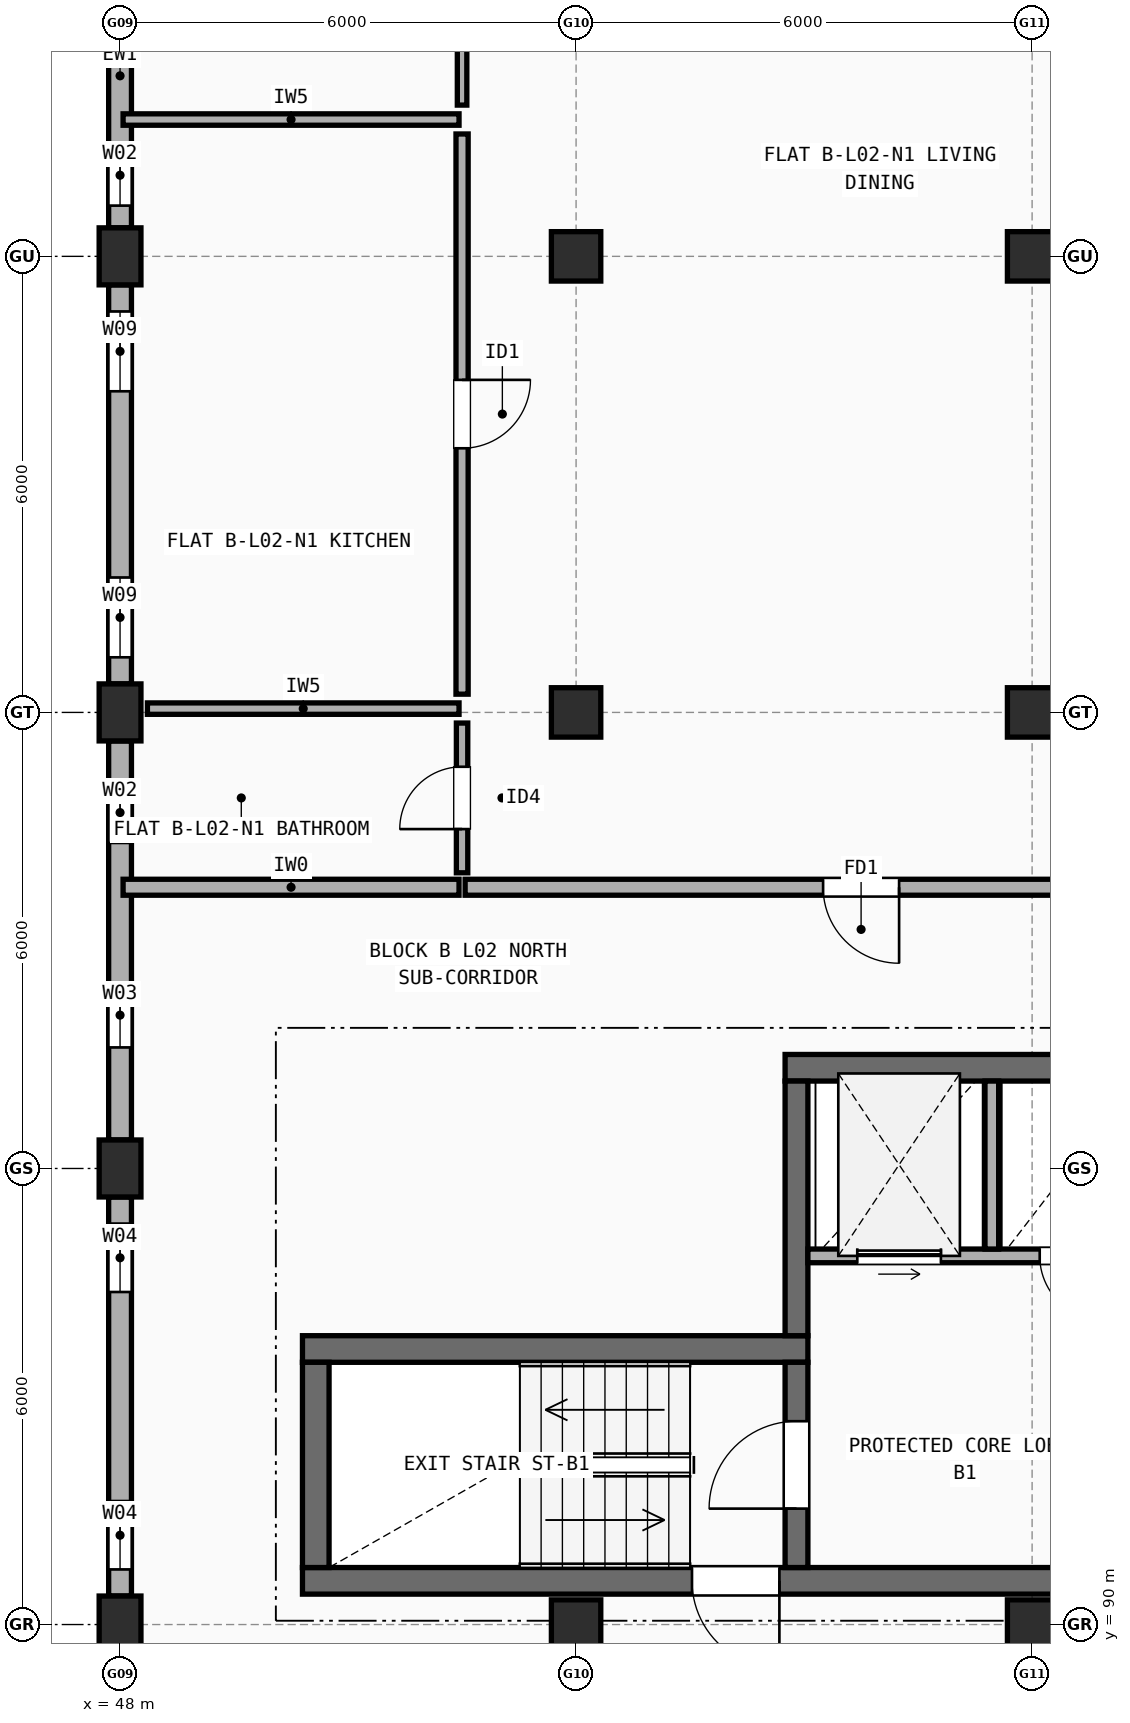
"""IFC4 building model, lengths in metres.
Left out: names, types, materials, properties, quantities, classifications, styles, units other than length and angle.
Written with IfcOpenShell. Run it as: python <this file> out.ifc"""

import sys

from ifc_helpers import new_model, si_unit, direction, frame, frame_2d, origin, origin_2d, place, context, subcontext, project, spatial, rectangle, extrude, element, fill, save


model = new_model("IFC4")
c1 = context("Model", 3, precision=1e-05, world=origin(), true_north=direction((0.0, 1.0)))
c2 = subcontext(c1, "Body", "Model", "MODEL_VIEW")
j1 = project(units=[si_unit("LENGTHUNIT", "METRE"), si_unit("PLANEANGLEUNIT", "RADIAN")], contexts=[c1])
p1 = place(None, origin())
s1 = spatial("IfcSite", under=j1, at=p1, CompositionType="ELEMENT")
p2 = place(p1, origin())
s2 = spatial("IfcBuilding", under=s1, at=p2, CompositionType="ELEMENT")
p3 = place(p2, frame((0.0, 0.0, 7.7)))
s3 = spatial("IfcBuildingStorey", under=s2, at=p3, CompositionType="ELEMENT", Elevation=7.7)
for number, where, z_axis, x_axis in (
    (1, (48.0, 90.0, 0.0), (0.0, 0.0, 1.0), (1.0, 0.0, 0.0)),
    (2, (48.0, 96.0, 0.0), (0.0, 0.0, 1.0), (1.0, 0.0, 0.0)),
    (3, (48.0, 102.0, 0.0), (0.0, 0.0, 1.0), (1.0, 0.0, 0.0)),
    (4, (48.0, 108.0, 0.0), (0.0, 0.0, 1.0), (1.0, 0.0, 0.0)),
):
    element("IfcColumn", number, at=place(p3, frame(where, z_axis=z_axis, x_axis=x_axis)), inside=s3, PredefinedType="COLUMN", context=c2, shape_type="SweptSolid", body=[
        extrude(rectangle(XDim=0.55, YDim=0.75, at=origin_2d()), origin(), (0.0, 0.0, 1.0), 2.955),
    ])
for number, where, z_axis, x_axis in (
    (5, (54.0, 90.0, 0.0), (0.0, 0.0, 1.0), (1.0, 0.0, 0.0)),
    (6, (54.0, 102.0, 0.0), (0.0, 0.0, 1.0), (1.0, 0.0, 0.0)),
    (7, (54.0, 108.0, 0.0), (0.0, 0.0, 1.0), (1.0, 0.0, 0.0)),
    (8, (60.0, 90.0, 0.0), (0.0, 0.0, 1.0), (1.0, 0.0, 0.0)),
    (9, (60.0, 102.0, 0.0), (0.0, 0.0, 1.0), (1.0, 0.0, 0.0)),
    (10, (60.0, 108.0, 0.0), (0.0, 0.0, 1.0), (1.0, 0.0, 0.0)),
):
    element("IfcColumn", number, at=place(p3, frame(where, z_axis=z_axis, x_axis=x_axis)), inside=s3, PredefinedType="COLUMN", context=c2, shape_type="SweptSolid", body=[
        extrude(rectangle(XDim=0.65, YDim=0.65, at=origin_2d()), origin(), (0.0, 0.0, 1.0), 2.955),
    ])
p4 = place(p3, frame((48.0, 113.625, 0.0), z_axis=(0.0, 0.0, 1.0), x_axis=(0.0, -1.0, 0.0)))
e11 = element("IfcWall", 11, at=p4, inside=s3, PredefinedType="STANDARD", context=c2, shape_type="SweptSolid", body=[
    extrude(rectangle(XDim=5.25, YDim=0.3, at=frame_2d((2.625, 0.0))), origin(), (0.0, 0.0, 1.0), 2.437),
])
p5 = place(p4, frame((1.442, 0.0, 0.9)))
e12 = element("IfcOpeningElement", 12, at=p5, cuts=e11, PredefinedType="OPENING", context=c2, shape_type="SweptSolid", body=[
    extrude(rectangle(XDim=0.9, YDim=1.3, at=frame_2d((0.45, 0.65))), frame((0.0, 0.16, 0.0), z_axis=(0.0, -1.0, 0.0), x_axis=(1.0, 0.0, 0.0)), (0.0, 0.0, 1.0), 0.32),
])
p6 = place(p4, frame((4.157, 0.0, 0.9)))
e13 = element("IfcOpeningElement", 13, at=p6, cuts=e11, PredefinedType="OPENING", context=c2, shape_type="SweptSolid", body=[
    extrude(rectangle(XDim=0.8, YDim=1.2, at=frame_2d((0.4, 0.6))), frame((0.0, 0.16, 0.0), z_axis=(0.0, -1.0, 0.0), x_axis=(1.0, 0.0, 0.0)), (0.0, 0.0, 1.0), 0.32),
])
p7 = place(p3, frame((48.0, 107.625, 0.0), z_axis=(0.0, 0.0, 1.0), x_axis=(0.0, -1.0, 0.0)))
e14 = element("IfcWall", 14, at=p7, inside=s3, PredefinedType="STANDARD", context=c2, shape_type="SweptSolid", body=[
    extrude(rectangle(XDim=5.25, YDim=0.3, at=frame_2d((2.625, 0.0))), origin(), (0.0, 0.0, 1.0), 2.437),
])
p8 = place(p7, frame((0.35, 0.0, 0.9)))
e15 = element("IfcOpeningElement", 15, at=p8, cuts=e14, PredefinedType="OPENING", context=c2, shape_type="SweptSolid", body=[
    extrude(rectangle(XDim=1.05, YDim=1.35, at=frame_2d((0.525, 0.675))), frame((0.0, 0.16, 0.0), z_axis=(0.0, -1.0, 0.0), x_axis=(1.0, 0.0, 0.0)), (0.0, 0.0, 1.0), 0.32),
])
p9 = place(p7, frame((3.85, 0.0, 0.9)))
e16 = element("IfcOpeningElement", 16, at=p9, cuts=e14, PredefinedType="OPENING", context=c2, shape_type="SweptSolid", body=[
    extrude(rectangle(XDim=1.05, YDim=1.35, at=frame_2d((0.525, 0.675))), frame((0.0, 0.16, 0.0), z_axis=(0.0, -1.0, 0.0), x_axis=(1.0, 0.0, 0.0)), (0.0, 0.0, 1.0), 0.32),
])
p10 = place(p3, frame((48.0, 101.625, 0.0), z_axis=(0.0, 0.0, 1.0), x_axis=(0.0, -1.0, 0.0)))
e17 = element("IfcWall", 17, at=p10, inside=s3, PredefinedType="STANDARD", context=c2, shape_type="SweptSolid", body=[
    extrude(rectangle(XDim=5.25, YDim=0.3, at=frame_2d((2.625, 0.0))), origin(), (0.0, 0.0, 1.0), 2.437),
])
p11 = place(p10, frame((0.542, 0.0, 0.9)))
e18 = element("IfcOpeningElement", 18, at=p11, cuts=e17, PredefinedType="OPENING", context=c2, shape_type="SweptSolid", body=[
    extrude(rectangle(XDim=0.8, YDim=1.2, at=frame_2d((0.4, 0.6))), frame((0.0, 0.16, 0.0), z_axis=(0.0, -1.0, 0.0), x_axis=(1.0, 0.0, 0.0)), (0.0, 0.0, 1.0), 0.32),
])
p12 = place(p10, frame((3.183, 0.0, 0.9)))
e19 = element("IfcOpeningElement", 19, at=p12, cuts=e17, PredefinedType="OPENING", context=c2, shape_type="SweptSolid", body=[
    extrude(rectangle(XDim=0.85, YDim=1.25, at=frame_2d((0.425, 0.625))), frame((0.0, 0.16, 0.0), z_axis=(0.0, -1.0, 0.0), x_axis=(1.0, 0.0, 0.0)), (0.0, 0.0, 1.0), 0.32),
])
p13 = place(p3, frame((48.0, 95.625, 0.0), z_axis=(0.0, 0.0, 1.0), x_axis=(0.0, -1.0, 0.0)))
e20 = element("IfcWall", 20, at=p13, inside=s3, PredefinedType="STANDARD", context=c2, shape_type="SweptSolid", body=[
    extrude(rectangle(XDim=5.25, YDim=0.3, at=frame_2d((2.625, 0.0))), origin(), (0.0, 0.0, 1.0), 2.437),
])
p14 = place(p13, frame((0.35, 0.0, 0.9)))
e21 = element("IfcOpeningElement", 21, at=p14, cuts=e20, PredefinedType="OPENING", context=c2, shape_type="SweptSolid", body=[
    extrude(rectangle(XDim=0.9, YDim=1.3, at=frame_2d((0.45, 0.65))), frame((0.0, 0.16, 0.0), z_axis=(0.0, -1.0, 0.0), x_axis=(1.0, 0.0, 0.0)), (0.0, 0.0, 1.0), 0.32),
])
p15 = place(p13, frame((4.0, 0.0, 0.9)))
e22 = element("IfcOpeningElement", 22, at=p15, cuts=e20, PredefinedType="OPENING", context=c2, shape_type="SweptSolid", body=[
    extrude(rectangle(XDim=0.9, YDim=1.3, at=frame_2d((0.45, 0.65))), frame((0.0, 0.16, 0.0), z_axis=(0.0, -1.0, 0.0), x_axis=(1.0, 0.0, 0.0)), (0.0, 0.0, 1.0), 0.32),
])
p16 = place(p3, frame((50.4, 90.575, 0.0), z_axis=(0.0, 0.0, 1.0), x_axis=(1.0, 0.0, 0.0)))
e23 = element("IfcWall", 23, at=p16, inside=s3, PredefinedType="SHEAR", context=c2, shape_type="SweptSolid", body=[
    extrude(rectangle(XDim=11.4, YDim=0.35, at=frame_2d((5.7, 0.0))), origin(), (0.0, 0.0, 1.0), 2.955),
])
p17 = place(p16, frame((5.125, 0.0, 0.0)))
e24 = element("IfcOpeningElement", 24, at=p17, cuts=e23, PredefinedType="OPENING", context=c2, shape_type="SweptSolid", body=[
    extrude(rectangle(XDim=1.15, YDim=2.15, at=frame_2d((0.575, 1.075))), frame((0.0, 0.185, 0.0), z_axis=(0.0, -1.0, 0.0), x_axis=(1.0, 0.0, 0.0)), (0.0, 0.0, 1.0), 0.37),
])
p18 = place(p3, frame((57.05, 93.625, 0.0), z_axis=(0.0, 0.0, 1.0), x_axis=(-1.0, 0.0, 0.0)))
e25 = element("IfcWall", 25, at=p18, inside=s3, PredefinedType="SHEAR", context=c2, shape_type="SweptSolid", body=[
    extrude(rectangle(XDim=6.65, YDim=0.35, at=frame_2d((3.325, 0.0))), origin(), (0.0, 0.0, 1.0), 2.955),
])
p19 = place(p3, frame((50.575, 93.45, 0.0), z_axis=(0.0, 0.0, 1.0), x_axis=(0.0, -1.0, 0.0)))
e26 = element("IfcWall", 26, at=p19, inside=s3, PredefinedType="SHEAR", context=c2, shape_type="SweptSolid", body=[
    extrude(rectangle(XDim=2.7, YDim=0.35, at=frame_2d((1.35, 0.0))), origin(), (0.0, 0.0, 1.0), 2.955),
])
p20 = place(p3, frame((56.9, 90.75, 0.0), z_axis=(0.0, 0.0, 1.0), x_axis=(0.0, 1.0, 0.0)))
e27 = element("IfcWall", 27, at=p20, inside=s3, PredefinedType="SHEAR", context=c2, shape_type="SweptSolid", body=[
    extrude(rectangle(XDim=2.7, YDim=0.3, at=frame_2d((1.35, 0.0))), origin(), (0.0, 0.0, 1.0), 2.955),
])
p21 = place(p20, frame((0.775, 0.0, 0.0)))
e28 = element("IfcOpeningElement", 28, at=p21, cuts=e27, PredefinedType="OPENING", context=c2, shape_type="SweptSolid", body=[
    extrude(rectangle(XDim=1.15, YDim=2.15, at=frame_2d((0.575, 1.075))), frame((0.0, 0.16, 0.0), z_axis=(0.0, -1.0, 0.0), x_axis=(1.0, 0.0, 0.0)), (0.0, 0.0, 1.0), 0.32),
])
p22 = place(p3, frame((61.8, 97.325, 0.0), z_axis=(0.0, 0.0, 1.0), x_axis=(-1.0, 0.0, 0.0)))
e29 = element("IfcWall", 29, at=p22, inside=s3, PredefinedType="SHEAR", context=c2, shape_type="SweptSolid", body=[
    extrude(rectangle(XDim=5.05, YDim=0.35, at=frame_2d((2.525, 0.0))), origin(), (0.0, 0.0, 1.0), 2.955),
])
p23 = place(p3, frame((56.9, 93.8, 0.0), z_axis=(0.0, 0.0, 1.0), x_axis=(0.0, 1.0, 0.0)))
e30 = element("IfcWall", 30, at=p23, inside=s3, PredefinedType="SHEAR", context=c2, shape_type="SweptSolid", body=[
    extrude(rectangle(XDim=3.35, YDim=0.3, at=frame_2d((1.675, 0.0))), origin(), (0.0, 0.0, 1.0), 2.955),
])
p24 = place(p3, frame((57.05, 94.85, 0.0), z_axis=(0.0, 0.0, 1.0), x_axis=(1.0, 0.0, 0.0)))
e31 = element("IfcWall", 31, at=p24, inside=s3, PredefinedType="SOLIDWALL", context=c2, shape_type="SweptSolid", body=[
    extrude(rectangle(XDim=4.4, YDim=0.18, at=frame_2d((2.2, 0.0))), origin(), (0.0, 0.0, 1.0), 2.955),
])
p25 = place(p24, frame((0.65, 0.0, 0.0)))
e32 = element("IfcOpeningElement", 32, at=p25, cuts=e31, PredefinedType="OPENING", context=c2, shape_type="SweptSolid", body=[
    extrude(rectangle(XDim=1.1, YDim=2.15, at=frame_2d((0.55, 1.075))), frame((0.0, 0.1, 0.0), z_axis=(0.0, -1.0, 0.0), x_axis=(1.0, 0.0, 0.0)), (0.0, 0.0, 1.0), 0.2),
])
p26 = place(p24, frame((3.05, 0.0, 0.0)))
e33 = element("IfcOpeningElement", 33, at=p26, cuts=e31, PredefinedType="OPENING", context=c2, shape_type="SweptSolid", body=[
    extrude(rectangle(XDim=0.85, YDim=2.1, at=frame_2d((0.425, 1.05))), frame((0.0, 0.1, 0.0), z_axis=(0.0, -1.0, 0.0), x_axis=(1.0, 0.0, 0.0)), (0.0, 0.0, 1.0), 0.2),
])
p27 = place(p3, frame((59.47, 94.94, 0.0), z_axis=(0.0, 0.0, 1.0), x_axis=(0.0, 1.0, 0.0)))
e34 = element("IfcWall", 34, at=p27, inside=s3, PredefinedType="SOLIDWALL", context=c2, shape_type="SweptSolid", body=[
    extrude(rectangle(XDim=2.21, YDim=0.18, at=frame_2d((1.105, 0.0))), origin(), (0.0, 0.0, 1.0), 2.955),
])
p28 = place(p3, frame((48.04, 99.7, 0.0), z_axis=(0.0, 0.0, 1.0), x_axis=(1.0, 0.0, 0.0)))
e35 = element("IfcWall", 35, at=p28, inside=s3, PredefinedType="SOLIDWALL", context=c2, shape_type="SweptSolid", body=[
    extrude(rectangle(XDim=4.42, YDim=0.21, at=frame_2d((2.21, 0.0))), origin(), (0.0, 0.0, 1.0), 2.437),
])
p29 = place(p3, frame((52.54, 99.7, 0.0), z_axis=(0.0, 0.0, 1.0), x_axis=(1.0, 0.0, 0.0)))
e36 = element("IfcWall", 36, at=p29, inside=s3, PredefinedType="SOLIDWALL", context=c2, shape_type="SweptSolid", body=[
    extrude(rectangle(XDim=10.42, YDim=0.21, at=frame_2d((5.21, 0.0))), origin(), (0.0, 0.0, 1.0), 2.508),
])
p30 = place(p29, frame((4.71, 0.0, 0.0)))
e37 = element("IfcOpeningElement", 37, at=p30, cuts=e36, PredefinedType="OPENING", context=c2, shape_type="SweptSolid", body=[
    extrude(rectangle(XDim=1.0, YDim=2.15, at=frame_2d((0.5, 1.075))), frame((0.0, 0.115, 0.0), z_axis=(0.0, -1.0, 0.0), x_axis=(1.0, 0.0, 0.0)), (0.0, 0.0, 1.0), 0.23),
])
p31 = place(p3, frame((52.5, 109.99, 0.0), z_axis=(0.0, 0.0, 1.0), x_axis=(0.0, 1.0, 0.0)))
e38 = element("IfcWall", 38, at=p31, inside=s3, PredefinedType="PARTITIONING", context=c2, shape_type="SweptSolid", body=[
    extrude(rectangle(XDim=3.82, YDim=0.125, at=frame_2d((1.91, 0.0))), origin(), (0.0, 0.0, 1.0), 2.955),
])
p32 = place(p31, frame((1.47, 0.0, 0.0)))
e39 = element("IfcOpeningElement", 39, at=p32, cuts=e38, PredefinedType="OPENING", context=c2, shape_type="SweptSolid", body=[
    extrude(rectangle(XDim=0.88, YDim=2.1, at=frame_2d((0.44, 1.05))), frame((0.0, 0.073, 0.0), z_axis=(0.0, -1.0, 0.0), x_axis=(1.0, 0.0, 0.0)), (0.0, 0.0, 1.0), 0.145),
])
p33 = place(p3, frame((52.5, 102.24, 0.0), z_axis=(0.0, 0.0, 1.0), x_axis=(0.0, 1.0, 0.0)))
e40 = element("IfcWall", 40, at=p33, inside=s3, PredefinedType="PLUMBINGWALL", context=c2, shape_type="SweptSolid", body=[
    extrude(rectangle(XDim=7.37, YDim=0.16, at=frame_2d((3.685, 0.0))), origin(), (0.0, 0.0, 1.0), 2.437),
])
p34 = place(p33, frame((3.235, 0.0, 0.0)))
e41 = element("IfcOpeningElement", 41, at=p34, cuts=e40, PredefinedType="OPENING", context=c2, shape_type="SweptSolid", body=[
    extrude(rectangle(XDim=0.9, YDim=2.1, at=frame_2d((0.45, 1.05))), frame((0.0, 0.09, 0.0), z_axis=(0.0, -1.0, 0.0), x_axis=(1.0, 0.0, 0.0)), (0.0, 0.0, 1.0), 0.18),
])
p35 = place(p3, frame((52.5, 99.89, 0.0), z_axis=(0.0, 0.0, 1.0), x_axis=(0.0, 1.0, 0.0)))
e42 = element("IfcWall", 42, at=p35, inside=s3, PredefinedType="PARTITIONING", context=c2, shape_type="SweptSolid", body=[
    extrude(rectangle(XDim=1.97, YDim=0.15, at=frame_2d((0.985, 0.0))), origin(), (0.0, 0.0, 1.0), 2.955),
])
p36 = place(p35, frame((0.575, 0.0, 0.0)))
e43 = element("IfcOpeningElement", 43, at=p36, cuts=e42, PredefinedType="OPENING", context=c2, shape_type="SweptSolid", body=[
    extrude(rectangle(XDim=0.82, YDim=2.08, at=frame_2d((0.41, 1.04))), frame((0.0, 0.085, 0.0), z_axis=(0.0, -1.0, 0.0), x_axis=(1.0, 0.0, 0.0)), (0.0, 0.0, 1.0), 0.17),
])
p37 = place(p3, frame((48.04, 109.8, 0.0), z_axis=(0.0, 0.0, 1.0), x_axis=(1.0, 0.0, 0.0)))
e44 = element("IfcWall", 44, at=p37, inside=s3, PredefinedType="PARTITIONING", context=c2, shape_type="SweptSolid", body=[
    extrude(rectangle(XDim=4.42, YDim=0.15, at=frame_2d((2.21, 0.0))), origin(), (0.0, 0.0, 1.0), 2.437),
])
p38 = place(p3, frame((48.36, 102.05, 0.0), z_axis=(0.0, 0.0, 1.0), x_axis=(1.0, 0.0, 0.0)))
e45 = element("IfcWall", 45, at=p38, inside=s3, PredefinedType="PARTITIONING", context=c2, shape_type="SweptSolid", body=[
    extrude(rectangle(XDim=4.1, YDim=0.15, at=frame_2d((2.05, 0.0))), origin(), (0.0, 0.0, 1.0), 2.437),
])
p39 = place(p6, origin())
e46 = element("IfcWindow", 46, at=p39, inside=s3, PartitioningType="SINGLE_PANEL", PredefinedType="WINDOW", context=c2, shape_type="SweptSolid", body=[
    extrude(rectangle(XDim=0.8, YDim=1.2, at=frame_2d((0.4, 0.6))), frame((0.0, 0.03, 0.0), z_axis=(0.0, -1.0, 0.0), x_axis=(1.0, 0.0, 0.0)), (0.0, 0.0, 1.0), 0.06),
])
fill(e13, e46)
p40 = place(p8, origin())
e47 = element("IfcWindow", 47, at=p40, inside=s3, PartitioningType="SINGLE_PANEL", PredefinedType="WINDOW", context=c2, shape_type="SweptSolid", body=[
    extrude(rectangle(XDim=1.05, YDim=1.35, at=frame_2d((0.525, 0.675))), frame((0.0, 0.03, 0.0), z_axis=(0.0, -1.0, 0.0), x_axis=(1.0, 0.0, 0.0)), (0.0, 0.0, 1.0), 0.06),
])
fill(e15, e47)
p41 = place(p9, origin())
e48 = element("IfcWindow", 48, at=p41, inside=s3, PartitioningType="SINGLE_PANEL", PredefinedType="WINDOW", context=c2, shape_type="SweptSolid", body=[
    extrude(rectangle(XDim=1.05, YDim=1.35, at=frame_2d((0.525, 0.675))), frame((0.0, 0.03, 0.0), z_axis=(0.0, -1.0, 0.0), x_axis=(1.0, 0.0, 0.0)), (0.0, 0.0, 1.0), 0.06),
])
fill(e16, e48)
p42 = place(p11, origin())
e49 = element("IfcWindow", 49, at=p42, inside=s3, PartitioningType="SINGLE_PANEL", PredefinedType="WINDOW", context=c2, shape_type="SweptSolid", body=[
    extrude(rectangle(XDim=0.8, YDim=1.2, at=frame_2d((0.4, 0.6))), frame((0.0, 0.03, 0.0), z_axis=(0.0, -1.0, 0.0), x_axis=(1.0, 0.0, 0.0)), (0.0, 0.0, 1.0), 0.06),
])
fill(e18, e49)
p43 = place(p12, origin())
e50 = element("IfcWindow", 50, at=p43, inside=s3, PartitioningType="SINGLE_PANEL", PredefinedType="WINDOW", context=c2, shape_type="SweptSolid", body=[
    extrude(rectangle(XDim=0.85, YDim=1.25, at=frame_2d((0.425, 0.625))), frame((0.0, 0.03, 0.0), z_axis=(0.0, -1.0, 0.0), x_axis=(1.0, 0.0, 0.0)), (0.0, 0.0, 1.0), 0.06),
])
fill(e19, e50)
p44 = place(p14, origin())
e51 = element("IfcWindow", 51, at=p44, inside=s3, PartitioningType="SINGLE_PANEL", PredefinedType="WINDOW", context=c2, shape_type="SweptSolid", body=[
    extrude(rectangle(XDim=0.9, YDim=1.3, at=frame_2d((0.45, 0.65))), frame((0.0, 0.03, 0.0), z_axis=(0.0, -1.0, 0.0), x_axis=(1.0, 0.0, 0.0)), (0.0, 0.0, 1.0), 0.06),
])
fill(e21, e51)
p45 = place(p15, origin())
e52 = element("IfcWindow", 52, at=p45, inside=s3, PartitioningType="SINGLE_PANEL", PredefinedType="WINDOW", context=c2, shape_type="SweptSolid", body=[
    extrude(rectangle(XDim=0.9, YDim=1.3, at=frame_2d((0.45, 0.65))), frame((0.0, 0.03, 0.0), z_axis=(0.0, -1.0, 0.0), x_axis=(1.0, 0.0, 0.0)), (0.0, 0.0, 1.0), 0.06),
])
fill(e22, e52)
p46 = place(p17, origin())
e53 = element("IfcDoor", 53, at=p46, inside=s3, OperationType="SINGLE_SWING_RIGHT", PredefinedType="DOOR", context=c2, shape_type="SweptSolid", body=[
    extrude(rectangle(XDim=1.15, YDim=2.15, at=frame_2d((0.575, 1.075))), frame((0.0, 0.025, 0.0), z_axis=(0.0, -1.0, 0.0), x_axis=(1.0, 0.0, 0.0)), (0.0, 0.0, 1.0), 0.05),
])
fill(e24, e53)
p47 = place(p21, origin())
e54 = element("IfcDoor", 54, at=p47, inside=s3, OperationType="SINGLE_SWING_LEFT", PredefinedType="DOOR", context=c2, shape_type="SweptSolid", body=[
    extrude(rectangle(XDim=1.15, YDim=2.15, at=frame_2d((0.575, 1.075))), frame((0.0, 0.025, 0.0), z_axis=(0.0, -1.0, 0.0), x_axis=(1.0, 0.0, 0.0)), (0.0, 0.0, 1.0), 0.05),
])
fill(e28, e54)
p48 = place(p25, origin())
e55 = element("IfcDoor", 55, at=p48, inside=s3, OperationType="SLIDING_TO_LEFT", PredefinedType="DOOR", context=c2, shape_type="SweptSolid", body=[
    extrude(rectangle(XDim=1.1, YDim=2.15, at=frame_2d((0.55, 1.075))), frame((0.0, 0.025, 0.0), z_axis=(0.0, -1.0, 0.0), x_axis=(1.0, 0.0, 0.0)), (0.0, 0.0, 1.0), 0.05),
])
fill(e32, e55)
p49 = place(p26, frame((0.85, 0.0, 0.0), z_axis=(0.0, 0.0, 1.0), x_axis=(-1.0, 0.0, 0.0)))
e56 = element("IfcDoor", 56, at=p49, inside=s3, OperationType="SINGLE_SWING_RIGHT", PredefinedType="DOOR", context=c2, shape_type="SweptSolid", body=[
    extrude(rectangle(XDim=0.85, YDim=2.1, at=frame_2d((0.425, 1.05))), frame((0.0, 0.025, 0.0), z_axis=(0.0, -1.0, 0.0), x_axis=(1.0, 0.0, 0.0)), (0.0, 0.0, 1.0), 0.05),
])
fill(e33, e56)
p50 = place(p30, origin())
e57 = element("IfcDoor", 57, at=p50, inside=s3, OperationType="SINGLE_SWING_RIGHT", PredefinedType="DOOR", context=c2, shape_type="SweptSolid", body=[
    extrude(rectangle(XDim=1.0, YDim=2.15, at=frame_2d((0.5, 1.075))), frame((0.0, 0.025, 0.0), z_axis=(0.0, -1.0, 0.0), x_axis=(1.0, 0.0, 0.0)), (0.0, 0.0, 1.0), 0.05),
])
fill(e37, e57)
p51 = place(p34, origin())
e58 = element("IfcDoor", 58, at=p51, inside=s3, OperationType="SINGLE_SWING_RIGHT", PredefinedType="DOOR", context=c2, shape_type="SweptSolid", body=[
    extrude(rectangle(XDim=0.9, YDim=2.1, at=frame_2d((0.45, 1.05))), frame((0.0, 0.025, 0.0), z_axis=(0.0, -1.0, 0.0), x_axis=(1.0, 0.0, 0.0)), (0.0, 0.0, 1.0), 0.05),
])
fill(e41, e58)
p52 = place(p36, origin())
e59 = element("IfcDoor", 59, at=p52, inside=s3, OperationType="SINGLE_SWING_LEFT", PredefinedType="DOOR", context=c2, shape_type="SweptSolid", body=[
    extrude(rectangle(XDim=0.82, YDim=2.08, at=frame_2d((0.41, 1.04))), frame((0.0, 0.025, 0.0), z_axis=(0.0, -1.0, 0.0), x_axis=(1.0, 0.0, 0.0)), (0.0, 0.0, 1.0), 0.05),
])
fill(e43, e59)
save(model, sys.argv[1])
